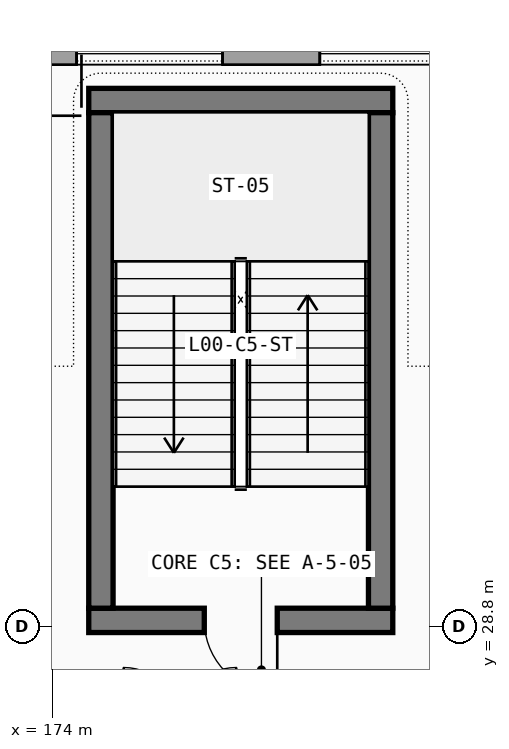
"""IFC4 building model, lengths in metres.
Left out: names, types, materials, properties, quantities, classifications, styles, units other than length and angle.
Written with IfcOpenShell. Run it as: python <this file> out.ifc"""

import sys

from ifc_helpers import new_model, si_unit, direction, frame, frame_2d, origin, place, context, subcontext, project, spatial, rectangle, extrude, element, fill, save


model = new_model("IFC4")
c1 = context("Model", 3, precision=1e-05, world=origin(), true_north=direction((0.0, 1.0)))
c2 = subcontext(c1, "Body", "Model", "MODEL_VIEW")
j1 = project(units=[si_unit("LENGTHUNIT", "METRE"), si_unit("PLANEANGLEUNIT", "RADIAN")], contexts=[c1])
p1 = place(None, origin())
s1 = spatial("IfcSite", under=j1, at=p1, CompositionType="ELEMENT")
p2 = place(p1, origin())
s2 = spatial("IfcBuilding", under=s1, at=p2, CompositionType="ELEMENT")
p3 = place(p2, origin())
s3 = spatial("IfcBuildingStorey", under=s2, at=p3, CompositionType="ELEMENT", Elevation=0.0)
p4 = place(p3, frame((182.4, 38.22, 0.0), z_axis=(0.0, 0.0, 1.0), x_axis=(-1.0, 0.0, 0.0)))
e1 = element("IfcWall", 1, at=p4, inside=s3, PredefinedType="SOLIDWALL", context=c2, shape_type="SweptSolid", body=[
    extrude(rectangle(XDim=9.6, YDim=0.36, at=frame_2d((4.8, 0.0))), origin(), (0.0, 0.0, 1.0), 3.664),
])
p5 = place(p4, frame((4.0, 0.0, 0.9), z_axis=(0.0, 0.0, 1.0), x_axis=(-1.0, 0.0, 0.0)))
e2 = element("IfcOpeningElement", 2, at=p5, cuts=e1, PredefinedType="OPENING", context=c2, shape_type="SweptSolid", body=[
    extrude(rectangle(XDim=2.4, YDim=2.5, at=frame_2d((1.2, 1.25))), frame((0.0, 0.19, 0.0), z_axis=(0.0, -1.0, 0.0), x_axis=(1.0, 0.0, 0.0)), (0.0, 0.0, 1.0), 0.38),
])
p6 = place(p4, frame((8.0, 0.0, 0.9), z_axis=(0.0, 0.0, 1.0), x_axis=(-1.0, 0.0, 0.0)))
e3 = element("IfcOpeningElement", 3, at=p6, cuts=e1, PredefinedType="OPENING", context=c2, shape_type="SweptSolid", body=[
    extrude(rectangle(XDim=2.4, YDim=2.5, at=frame_2d((1.2, 1.25))), frame((0.0, 0.19, 0.0), z_axis=(0.0, -1.0, 0.0), x_axis=(1.0, 0.0, 0.0)), (0.0, 0.0, 1.0), 0.38),
])
p7 = place(p3, frame((174.6, 28.9, 0.0), z_axis=(0.0, 0.0, 1.0), x_axis=(1.0, 0.0, 0.0)))
e4 = element("IfcWall", 4, at=p7, inside=s3, PredefinedType="SHEAR", context=c2, shape_type="SweptSolid", body=[
    extrude(rectangle(XDim=5.0, YDim=0.4, at=frame_2d((2.5, 0.0))), origin(), (0.0, 0.0, 1.0), 4.5),
])
p8 = place(p7, frame((3.1, 0.0, 0.0), z_axis=(0.0, 0.0, 1.0), x_axis=(-1.0, 0.0, 0.0)))
e5 = element("IfcOpeningElement", 5, at=p8, cuts=e4, PredefinedType="OPENING", context=c2, shape_type="SweptSolid", body=[
    extrude(rectangle(XDim=1.2, YDim=2.2, at=frame_2d((0.6, 1.1))), frame((0.0, 0.21, 0.0), z_axis=(0.0, -1.0, 0.0), x_axis=(1.0, 0.0, 0.0)), (0.0, 0.0, 1.0), 0.42),
])
p9 = place(p3, frame((179.6, 37.45, 0.0), z_axis=(0.0, 0.0, 1.0), x_axis=(-1.0, 0.0, 0.0)))
e6 = element("IfcWall", 6, at=p9, inside=s3, PredefinedType="SHEAR", context=c2, shape_type="SweptSolid", body=[
    extrude(rectangle(XDim=5.0, YDim=0.4, at=frame_2d((2.5, 0.0))), origin(), (0.0, 0.0, 1.0), 4.5),
])
for number, where, z_axis, x_axis in (
    (7, (174.8, 37.25, 0.0), (0.0, 0.0, 1.0), (0.0, -1.0, 0.0)),
    (8, (179.4, 29.1, 0.0), (0.0, 0.0, 1.0), (0.0, 1.0, 0.0)),
):
    element("IfcWall", number, at=place(p3, frame(where, z_axis=z_axis, x_axis=x_axis)), inside=s3, PredefinedType="SHEAR", context=c2, shape_type="SweptSolid", body=[
        extrude(rectangle(XDim=8.15, YDim=0.4, at=frame_2d((4.075, 0.0))), origin(), (0.0, 0.0, 1.0), 4.5),
    ])
p10 = place(p5, origin())
e9 = element("IfcWindow", 9, at=p10, inside=s3, PartitioningType="SINGLE_PANEL", PredefinedType="WINDOW", context=c2, shape_type="SweptSolid", body=[
    extrude(rectangle(XDim=2.4, YDim=2.5, at=frame_2d((1.2, 1.25))), frame((0.0, 0.03, 0.0), z_axis=(0.0, -1.0, 0.0), x_axis=(1.0, 0.0, 0.0)), (0.0, 0.0, 1.0), 0.06),
])
fill(e2, e9)
p11 = place(p6, origin())
e10 = element("IfcWindow", 10, at=p11, inside=s3, PartitioningType="SINGLE_PANEL", PredefinedType="WINDOW", context=c2, shape_type="SweptSolid", body=[
    extrude(rectangle(XDim=2.4, YDim=2.5, at=frame_2d((1.2, 1.25))), frame((0.0, 0.03, 0.0), z_axis=(0.0, -1.0, 0.0), x_axis=(1.0, 0.0, 0.0)), (0.0, 0.0, 1.0), 0.06),
])
fill(e3, e10)
p12 = place(p8, origin())
e11 = element("IfcDoor", 11, at=p12, inside=s3, OperationType="SINGLE_SWING_LEFT", PredefinedType="DOOR", context=c2, shape_type="SweptSolid", body=[
    extrude(rectangle(XDim=1.2, YDim=2.2, at=frame_2d((0.6, 1.1))), frame((0.0, 0.025, 0.0), z_axis=(0.0, -1.0, 0.0), x_axis=(1.0, 0.0, 0.0)), (0.0, 0.0, 1.0), 0.05),
])
fill(e5, e11)
save(model, sys.argv[1])
